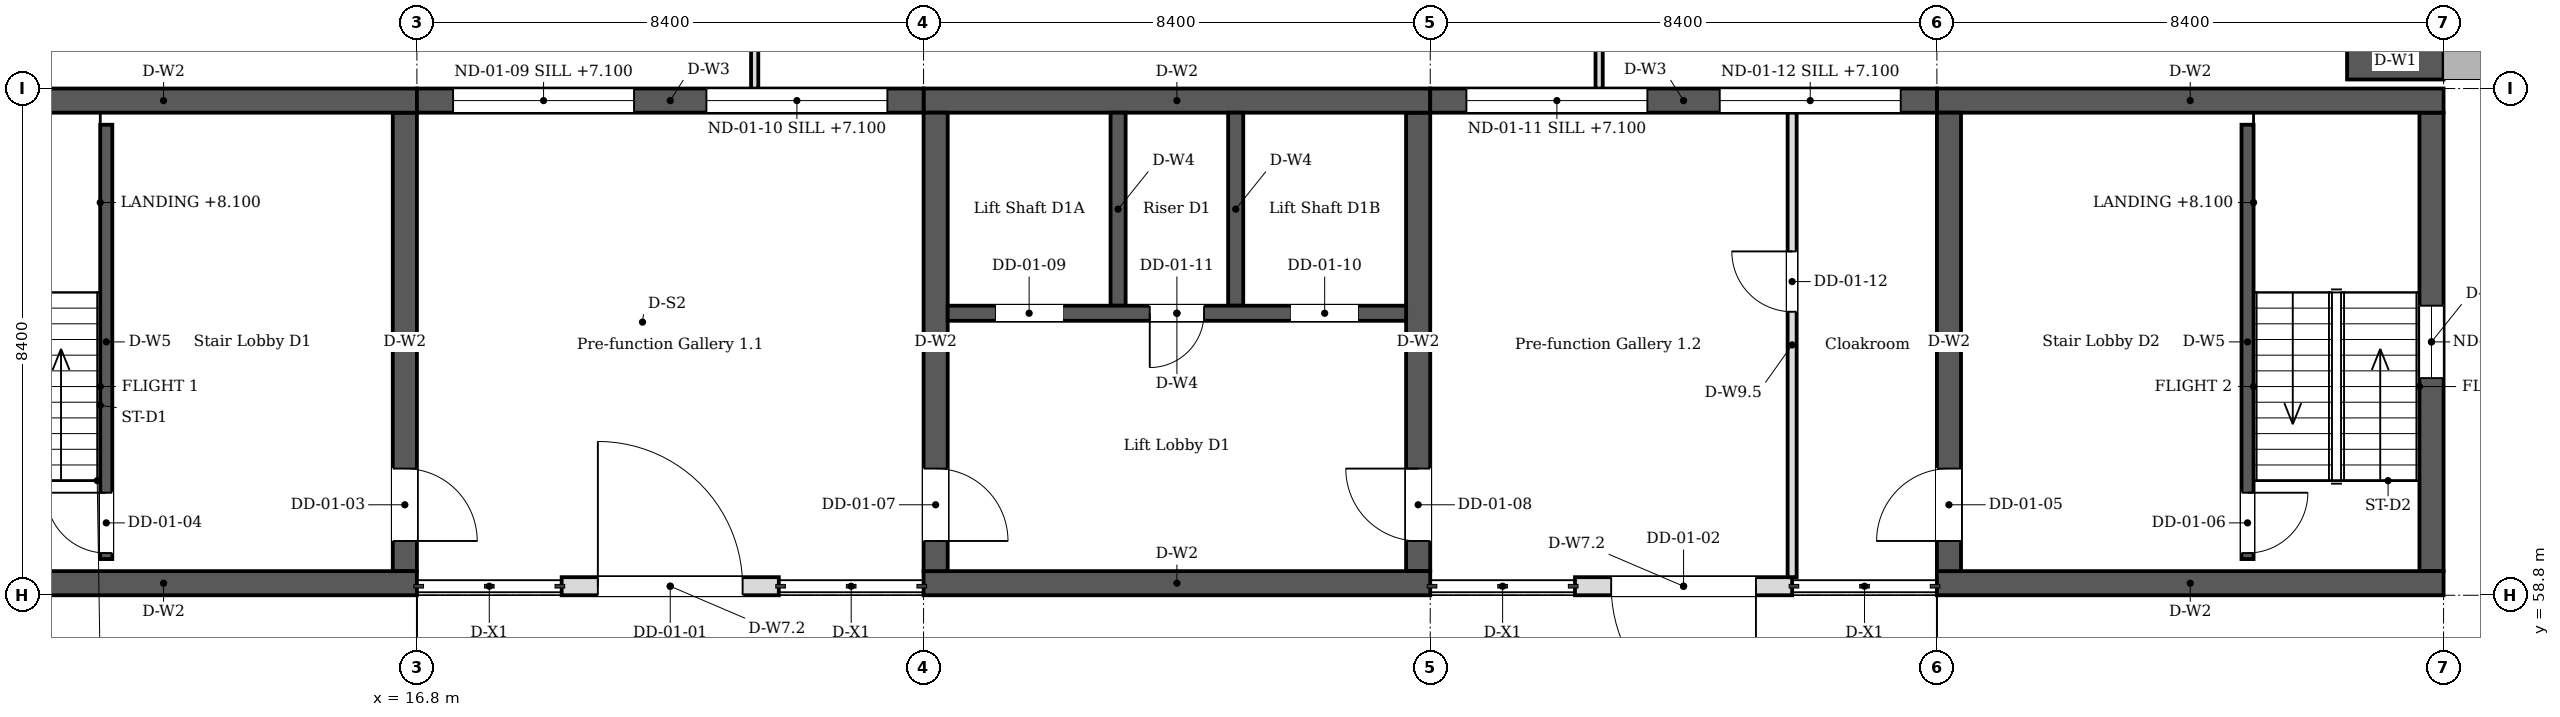
"""IFC4 building model, lengths in metres.
Left out: names, types, materials, properties, quantities, classifications, styles, units other than length and angle.
Written with IfcOpenShell. Run it as: python <this file> out.ifc"""

import sys

from ifc_helpers import new_model, si_unit, direction, frame, frame_2d, origin, place, context, subcontext, project, spatial, rectangle, extrude, element, fill, save


model = new_model("IFC4")
c1 = context("Model", 3, precision=1e-05, world=origin(), true_north=direction((0.0, 1.0)))
c2 = subcontext(c1, "Body", "Model", "MODEL_VIEW")
j1 = project(units=[si_unit("LENGTHUNIT", "METRE"), si_unit("PLANEANGLEUNIT", "RADIAN")], contexts=[c1])
p1 = place(None, origin())
s1 = spatial("IfcSite", under=j1, at=p1, CompositionType="ELEMENT")
p2 = place(p1, origin())
s2 = spatial("IfcBuilding", under=s1, at=p2, CompositionType="ELEMENT")
p3 = place(p2, origin())
s3 = spatial("IfcBuildingStorey", under=s2, at=p3, CompositionType="ELEMENT", Elevation=0.0)
p4 = place(p3, frame((50.4, 67.65, 0.0), z_axis=(0.0, 0.0, 1.0), x_axis=(-1.0, 0.0, 0.0)))
e1 = element("IfcWall", 1, at=p4, inside=s3, PredefinedType="SOLIDWALL", context=c2, shape_type="SweptSolid", body=[
    extrude(rectangle(XDim=1.6, YDim=0.6, at=frame_2d((0.8, 0.0))), origin(), (0.0, 0.0, 1.0), 14.467),
])
p5 = place(p2, frame((0.0, 0.0, 6.0)))
s4 = spatial("IfcBuildingStorey", under=s2, at=p5, CompositionType="ELEMENT", Elevation=6.0)
for number, where, z_axis, x_axis in (
    (2, (8.4, 59.0, 0.0), (0.0, 0.0, 1.0), (1.0, 0.0, 0.0)),
    (3, (8.4, 67.0, 0.0), (0.0, 0.0, 1.0), (1.0, 0.0, 0.0)),
):
    element("IfcWall", number, at=place(p5, frame(where, z_axis=z_axis, x_axis=x_axis)), inside=s4, PredefinedType="SOLIDWALL", context=c2, shape_type="SweptSolid", body=[
        extrude(rectangle(XDim=8.4, YDim=0.4, at=frame_2d((4.2, 0.0))), origin(), (0.0, 0.0, 1.0), 3.92),
    ])
p6 = place(p5, frame((16.6, 59.2, 0.0), z_axis=(0.0, 0.0, 1.0), x_axis=(0.0, 1.0, 0.0)))
e4 = element("IfcWall", 4, at=p6, inside=s4, PredefinedType="SOLIDWALL", context=c2, shape_type="SweptSolid", body=[
    extrude(rectangle(XDim=7.6, YDim=0.4, at=frame_2d((3.8, 0.0))), origin(), (0.0, 0.0, 1.0), 3.92),
])
p7 = place(p6, frame((0.5, 0.0, 0.0)))
e5 = element("IfcOpeningElement", 5, at=p7, cuts=e4, PredefinedType="OPENING", context=c2, shape_type="SweptSolid", body=[
    extrude(rectangle(XDim=1.2, YDim=2.1, at=frame_2d((0.6, 1.05))), frame((0.0, 0.21, 0.0), z_axis=(0.0, -1.0, 0.0), x_axis=(1.0, 0.0, 0.0)), (0.0, 0.0, 1.0), 0.42),
])
for number, where, z_axis, x_axis in (
    (6, (25.2, 59.0, 0.0), (0.0, 0.0, 1.0), (1.0, 0.0, 0.0)),
    (7, (25.2, 67.0, 0.0), (0.0, 0.0, 1.0), (1.0, 0.0, 0.0)),
):
    element("IfcWall", number, at=place(p5, frame(where, z_axis=z_axis, x_axis=x_axis)), inside=s4, PredefinedType="SOLIDWALL", context=c2, shape_type="SweptSolid", body=[
        extrude(rectangle(XDim=8.4, YDim=0.4, at=frame_2d((4.2, 0.0))), origin(), (0.0, 0.0, 1.0), 3.92),
    ])
p8 = place(p5, frame((25.4, 59.2, 0.0), z_axis=(0.0, 0.0, 1.0), x_axis=(0.0, 1.0, 0.0)))
e8 = element("IfcWall", 8, at=p8, inside=s4, PredefinedType="SOLIDWALL", context=c2, shape_type="SweptSolid", body=[
    extrude(rectangle(XDim=7.6, YDim=0.4, at=frame_2d((3.8, 0.0))), origin(), (0.0, 0.0, 1.0), 3.92),
])
p9 = place(p8, frame((0.5, 0.0, 0.0)))
e9 = element("IfcOpeningElement", 9, at=p9, cuts=e8, PredefinedType="OPENING", context=c2, shape_type="SweptSolid", body=[
    extrude(rectangle(XDim=1.2, YDim=2.1, at=frame_2d((0.6, 1.05))), frame((0.0, 0.21, 0.0), z_axis=(0.0, -1.0, 0.0), x_axis=(1.0, 0.0, 0.0)), (0.0, 0.0, 1.0), 0.42),
])
p10 = place(p5, frame((33.4, 59.2, 0.0), z_axis=(0.0, 0.0, 1.0), x_axis=(0.0, 1.0, 0.0)))
e10 = element("IfcWall", 10, at=p10, inside=s4, PredefinedType="SOLIDWALL", context=c2, shape_type="SweptSolid", body=[
    extrude(rectangle(XDim=7.6, YDim=0.4, at=frame_2d((3.8, 0.0))), origin(), (0.0, 0.0, 1.0), 3.92),
])
p11 = place(p10, frame((0.5, 0.0, 0.0)))
e11 = element("IfcOpeningElement", 11, at=p11, cuts=e10, PredefinedType="OPENING", context=c2, shape_type="SweptSolid", body=[
    extrude(rectangle(XDim=1.2, YDim=2.1, at=frame_2d((0.6, 1.05))), frame((0.0, 0.21, 0.0), z_axis=(0.0, -1.0, 0.0), x_axis=(1.0, 0.0, 0.0)), (0.0, 0.0, 1.0), 0.42),
])
for number, where, z_axis, x_axis in (
    (12, (42.0, 59.0, 0.0), (0.0, 0.0, 1.0), (1.0, 0.0, 0.0)),
    (13, (42.0, 67.0, 0.0), (0.0, 0.0, 1.0), (1.0, 0.0, 0.0)),
):
    element("IfcWall", number, at=place(p5, frame(where, z_axis=z_axis, x_axis=x_axis)), inside=s4, PredefinedType="SOLIDWALL", context=c2, shape_type="SweptSolid", body=[
        extrude(rectangle(XDim=8.4, YDim=0.4, at=frame_2d((4.2, 0.0))), origin(), (0.0, 0.0, 1.0), 3.92),
    ])
p12 = place(p5, frame((42.2, 59.2, 0.0), z_axis=(0.0, 0.0, 1.0), x_axis=(0.0, 1.0, 0.0)))
e14 = element("IfcWall", 14, at=p12, inside=s4, PredefinedType="SOLIDWALL", context=c2, shape_type="SweptSolid", body=[
    extrude(rectangle(XDim=7.6, YDim=0.4, at=frame_2d((3.8, 0.0))), origin(), (0.0, 0.0, 1.0), 3.92),
])
p13 = place(p12, frame((0.5, 0.0, 0.0)))
e15 = element("IfcOpeningElement", 15, at=p13, cuts=e14, PredefinedType="OPENING", context=c2, shape_type="SweptSolid", body=[
    extrude(rectangle(XDim=1.2, YDim=2.1, at=frame_2d((0.6, 1.05))), frame((0.0, 0.21, 0.0), z_axis=(0.0, -1.0, 0.0), x_axis=(1.0, 0.0, 0.0)), (0.0, 0.0, 1.0), 0.42),
])
p14 = place(p5, frame((50.2, 59.2, 0.0), z_axis=(0.0, 0.0, 1.0), x_axis=(0.0, 1.0, 0.0)))
e16 = element("IfcWall", 16, at=p14, inside=s4, PredefinedType="SOLIDWALL", context=c2, shape_type="SweptSolid", body=[
    extrude(rectangle(XDim=7.6, YDim=0.4, at=frame_2d((3.8, 0.0))), origin(), (0.0, 0.0, 1.0), 3.92),
])
p15 = place(p14, frame((3.2, 0.0, 0.9)))
e17 = element("IfcOpeningElement", 17, at=p15, cuts=e16, PredefinedType="OPENING", context=c2, shape_type="SweptSolid", body=[
    extrude(rectangle(XDim=1.2, YDim=1.5, at=frame_2d((0.6, 0.75))), frame((0.0, 0.21, 0.0), z_axis=(0.0, -1.0, 0.0), x_axis=(1.0, 0.0, 0.0)), (0.0, 0.0, 1.0), 0.42),
])
p16 = place(p5, frame((25.6, 63.475, 0.0), z_axis=(0.0, 0.0, 1.0), x_axis=(1.0, 0.0, 0.0)))
e18 = element("IfcWall", 18, at=p16, inside=s4, PredefinedType="SOLIDWALL", context=c2, shape_type="SweptSolid", body=[
    extrude(rectangle(XDim=7.6, YDim=0.25, at=frame_2d((3.8, 0.0))), origin(), (0.0, 0.0, 1.0), 3.92),
])
p17 = place(p16, frame((0.8, 0.0, 0.0)))
e19 = element("IfcOpeningElement", 19, at=p17, cuts=e18, PredefinedType="OPENING", context=c2, shape_type="SweptSolid", body=[
    extrude(rectangle(XDim=1.1, YDim=2.1, at=frame_2d((0.55, 1.05))), frame((0.0, 0.135, 0.0), z_axis=(0.0, -1.0, 0.0), x_axis=(1.0, 0.0, 0.0)), (0.0, 0.0, 1.0), 0.27),
])
p18 = place(p16, frame((5.7, 0.0, 0.0)))
e20 = element("IfcOpeningElement", 20, at=p18, cuts=e18, PredefinedType="OPENING", context=c2, shape_type="SweptSolid", body=[
    extrude(rectangle(XDim=1.1, YDim=2.1, at=frame_2d((0.55, 1.05))), frame((0.0, 0.135, 0.0), z_axis=(0.0, -1.0, 0.0), x_axis=(1.0, 0.0, 0.0)), (0.0, 0.0, 1.0), 0.27),
])
p19 = place(p16, frame((3.35, 0.0, 0.0)))
e21 = element("IfcOpeningElement", 21, at=p19, cuts=e18, PredefinedType="OPENING", context=c2, shape_type="SweptSolid", body=[
    extrude(rectangle(XDim=0.9, YDim=2.1, at=frame_2d((0.45, 1.05))), frame((0.0, 0.135, 0.0), z_axis=(0.0, -1.0, 0.0), x_axis=(1.0, 0.0, 0.0)), (0.0, 0.0, 1.0), 0.27),
])
for number, where, z_axis, x_axis in (
    (22, (28.425, 63.6, 0.0), (0.0, 0.0, 1.0), (0.0, 1.0, 0.0)),
    (23, (30.375, 63.6, 0.0), (0.0, 0.0, 1.0), (0.0, 1.0, 0.0)),
):
    element("IfcWall", number, at=place(p5, frame(where, z_axis=z_axis, x_axis=x_axis)), inside=s4, PredefinedType="SOLIDWALL", context=c2, shape_type="SweptSolid", body=[
        extrude(rectangle(XDim=3.2, YDim=0.25, at=frame_2d((1.6, 0.0))), origin(), (0.0, 0.0, 1.0), 3.92),
    ])
p20 = place(p5, frame((11.65, 59.4, 0.0), z_axis=(0.0, 0.0, 1.0), x_axis=(0.0, 1.0, 0.0)))
e24 = element("IfcWall", 24, at=p20, inside=s4, PredefinedType="SOLIDWALL", context=c2, shape_type="SweptSolid", body=[
    extrude(rectangle(XDim=7.2, YDim=0.2, at=frame_2d((3.6, 0.0))), origin(), (0.0, 0.0, 1.0), 3.92),
])
p21 = place(p20, frame((0.1, 0.0, 0.0)))
e25 = element("IfcOpeningElement", 25, at=p21, cuts=e24, PredefinedType="OPENING", context=c2, shape_type="SweptSolid", body=[
    extrude(rectangle(XDim=1.0, YDim=2.1, at=frame_2d((0.5, 1.05))), frame((0.0, 0.11, 0.0), z_axis=(0.0, -1.0, 0.0), x_axis=(1.0, 0.0, 0.0)), (0.0, 0.0, 1.0), 0.22),
])
p22 = place(p5, frame((47.15, 59.4, 0.0), z_axis=(0.0, 0.0, 1.0), x_axis=(0.0, 1.0, 0.0)))
e26 = element("IfcWall", 26, at=p22, inside=s4, PredefinedType="SOLIDWALL", context=c2, shape_type="SweptSolid", body=[
    extrude(rectangle(XDim=7.2, YDim=0.2, at=frame_2d((3.6, 0.0))), origin(), (0.0, 0.0, 1.0), 3.92),
])
p23 = place(p22, frame((0.1, 0.0, 0.0)))
e27 = element("IfcOpeningElement", 27, at=p23, cuts=e26, PredefinedType="OPENING", context=c2, shape_type="SweptSolid", body=[
    extrude(rectangle(XDim=1.0, YDim=2.1, at=frame_2d((0.5, 1.05))), frame((0.0, 0.11, 0.0), z_axis=(0.0, -1.0, 0.0), x_axis=(1.0, 0.0, 0.0)), (0.0, 0.0, 1.0), 0.22),
])
p24 = place(p5, frame((19.2, 58.95, 0.0), z_axis=(0.0, 0.0, 1.0), x_axis=(1.0, 0.0, 0.0)))
e28 = element("IfcWall", 28, at=p24, inside=s4, PredefinedType="SOLIDWALL", context=c2, shape_type="SweptSolid", body=[
    extrude(rectangle(XDim=3.6, YDim=0.3, at=frame_2d((1.8, 0.0))), origin(), (0.0, 0.0, 1.0), 3.42),
])
p25 = place(p24, frame((0.6, 0.0, 0.0)))
e29 = element("IfcOpeningElement", 29, at=p25, cuts=e28, PredefinedType="OPENING", context=c2, shape_type="SweptSolid", body=[
    extrude(rectangle(XDim=2.4, YDim=2.4, at=frame_2d((1.2, 1.2))), frame((0.0, 0.16, 0.0), z_axis=(0.0, -1.0, 0.0), x_axis=(1.0, 0.0, 0.0)), (0.0, 0.0, 1.0), 0.32),
])
p26 = place(p5, frame((36.0, 58.95, 0.0), z_axis=(0.0, 0.0, 1.0), x_axis=(1.0, 0.0, 0.0)))
e30 = element("IfcWall", 30, at=p26, inside=s4, PredefinedType="SOLIDWALL", context=c2, shape_type="SweptSolid", body=[
    extrude(rectangle(XDim=3.6, YDim=0.3, at=frame_2d((1.8, 0.0))), origin(), (0.0, 0.0, 1.0), 3.42),
])
p27 = place(p26, frame((0.6, 0.0, 0.0)))
e31 = element("IfcOpeningElement", 31, at=p27, cuts=e30, PredefinedType="OPENING", context=c2, shape_type="SweptSolid", body=[
    extrude(rectangle(XDim=2.4, YDim=2.4, at=frame_2d((1.2, 1.2))), frame((0.0, 0.16, 0.0), z_axis=(0.0, -1.0, 0.0), x_axis=(1.0, 0.0, 0.0)), (0.0, 0.0, 1.0), 0.32),
])
for number, where, z_axis, x_axis in (
    (32, (22.4, 67.2, 0.0), (0.0, 0.0, 1.0), (0.0, 1.0, 0.0)),
    (33, (36.4, 67.2, 0.0), (0.0, 0.0, 1.0), (0.0, 1.0, 0.0)),
):
    element("IfcWall", number, at=place(p3, frame(where, z_axis=z_axis, x_axis=x_axis)), inside=s3, PredefinedType="MOVABLE", context=c2, shape_type="SweptSolid", body=[
        extrude(rectangle(XDim=33.6, YDim=0.12, at=frame_2d((16.8, 0.0))), origin(), (0.0, 0.0, 1.0), 14.467),
    ])
p28 = place(p5, frame((16.8, 67.0, 0.0), z_axis=(0.0, 0.0, 1.0), x_axis=(1.0, 0.0, 0.0)))
e34 = element("IfcWall", 34, at=p28, inside=s4, PredefinedType="SOLIDWALL", context=c2, shape_type="SweptSolid", body=[
    extrude(rectangle(XDim=8.4, YDim=0.4, at=frame_2d((4.2, 0.0))), origin(), (0.0, 0.0, 1.0), 3.42),
])
p29 = place(p28, frame((0.6, 0.0, 1.1)))
e35 = element("IfcOpeningElement", 35, at=p29, cuts=e34, PredefinedType="OPENING", context=c2, shape_type="SweptSolid", body=[
    extrude(rectangle(XDim=3.0, YDim=2.0, at=frame_2d((1.5, 1.0))), frame((0.0, 0.21, 0.0), z_axis=(0.0, -1.0, 0.0), x_axis=(1.0, 0.0, 0.0)), (0.0, 0.0, 1.0), 0.42),
])
p30 = place(p28, frame((4.8, 0.0, 1.1)))
e36 = element("IfcOpeningElement", 36, at=p30, cuts=e34, PredefinedType="OPENING", context=c2, shape_type="SweptSolid", body=[
    extrude(rectangle(XDim=3.0, YDim=2.0, at=frame_2d((1.5, 1.0))), frame((0.0, 0.21, 0.0), z_axis=(0.0, -1.0, 0.0), x_axis=(1.0, 0.0, 0.0)), (0.0, 0.0, 1.0), 0.42),
])
p31 = place(p5, frame((33.6, 67.0, 0.0), z_axis=(0.0, 0.0, 1.0), x_axis=(1.0, 0.0, 0.0)))
e37 = element("IfcWall", 37, at=p31, inside=s4, PredefinedType="SOLIDWALL", context=c2, shape_type="SweptSolid", body=[
    extrude(rectangle(XDim=8.4, YDim=0.4, at=frame_2d((4.2, 0.0))), origin(), (0.0, 0.0, 1.0), 3.42),
])
p32 = place(p31, frame((0.6, 0.0, 1.1)))
e38 = element("IfcOpeningElement", 38, at=p32, cuts=e37, PredefinedType="OPENING", context=c2, shape_type="SweptSolid", body=[
    extrude(rectangle(XDim=3.0, YDim=2.0, at=frame_2d((1.5, 1.0))), frame((0.0, 0.21, 0.0), z_axis=(0.0, -1.0, 0.0), x_axis=(1.0, 0.0, 0.0)), (0.0, 0.0, 1.0), 0.42),
])
p33 = place(p31, frame((4.8, 0.0, 1.1)))
e39 = element("IfcOpeningElement", 39, at=p33, cuts=e37, PredefinedType="OPENING", context=c2, shape_type="SweptSolid", body=[
    extrude(rectangle(XDim=3.0, YDim=2.0, at=frame_2d((1.5, 1.0))), frame((0.0, 0.21, 0.0), z_axis=(0.0, -1.0, 0.0), x_axis=(1.0, 0.0, 0.0)), (0.0, 0.0, 1.0), 0.42),
])
p34 = place(p5, frame((39.6, 59.1, 0.0), z_axis=(0.0, 0.0, 1.0), x_axis=(0.0, 1.0, 0.0)))
e40 = element("IfcWall", 40, at=p34, inside=s4, PredefinedType="PARTITIONING", context=c2, shape_type="SweptSolid", body=[
    extrude(rectangle(XDim=7.7, YDim=0.15, at=frame_2d((3.85, 0.0))), origin(), (0.0, 0.0, 1.0), 3.92),
])
p35 = place(p34, frame((4.4, 0.0, 0.0)))
e41 = element("IfcOpeningElement", 41, at=p35, cuts=e40, PredefinedType="OPENING", context=c2, shape_type="SweptSolid", body=[
    extrude(rectangle(XDim=1.0, YDim=2.1, at=frame_2d((0.5, 1.05))), frame((0.0, 0.085, 0.0), z_axis=(0.0, -1.0, 0.0), x_axis=(1.0, 0.0, 0.0)), (0.0, 0.0, 1.0), 0.17),
])
p36 = place(p25, origin())
e42 = element("IfcDoor", 42, at=p36, inside=s4, OperationType="DOUBLE_DOOR_SINGLE_SWING", PredefinedType="DOOR", context=c2, shape_type="SweptSolid", body=[
    extrude(rectangle(XDim=2.4, YDim=2.4, at=frame_2d((1.2, 1.2))), frame((0.0, 0.025, 0.0), z_axis=(0.0, -1.0, 0.0), x_axis=(1.0, 0.0, 0.0)), (0.0, 0.0, 1.0), 0.05),
])
fill(e29, e42)
p37 = place(p27, origin())
e43 = element("IfcDoor", 43, at=p37, inside=s4, OperationType="DOUBLE_DOOR_SINGLE_SWING", PredefinedType="DOOR", context=c2, shape_type="SweptSolid", body=[
    extrude(rectangle(XDim=2.4, YDim=2.4, at=frame_2d((1.2, 1.2))), frame((0.0, 0.025, 0.0), z_axis=(0.0, -1.0, 0.0), x_axis=(1.0, 0.0, 0.0)), (0.0, 0.0, 1.0), 0.05),
])
fill(e31, e43)
p38 = place(p15, origin())
e44 = element("IfcWindow", 44, at=p38, inside=s4, PartitioningType="SINGLE_PANEL", PredefinedType="WINDOW", context=c2, shape_type="SweptSolid", body=[
    extrude(rectangle(XDim=1.2, YDim=1.5, at=frame_2d((0.6, 0.75))), frame((0.0, 0.03, 0.0), z_axis=(0.0, -1.0, 0.0), x_axis=(1.0, 0.0, 0.0)), (0.0, 0.0, 1.0), 0.06),
])
fill(e17, e44)
p39 = place(p7, origin())
e45 = element("IfcDoor", 45, at=p39, inside=s4, OperationType="SINGLE_SWING_LEFT", PredefinedType="DOOR", context=c2, shape_type="SweptSolid", body=[
    extrude(rectangle(XDim=1.2, YDim=2.1, at=frame_2d((0.6, 1.05))), frame((0.0, 0.025, 0.0), z_axis=(0.0, -1.0, 0.0), x_axis=(1.0, 0.0, 0.0)), (0.0, 0.0, 1.0), 0.05),
])
fill(e5, e45)
p40 = place(p21, origin())
e46 = element("IfcDoor", 46, at=p40, inside=s4, OperationType="SINGLE_SWING_LEFT", PredefinedType="DOOR", context=c2, shape_type="SweptSolid", body=[
    extrude(rectangle(XDim=1.0, YDim=2.1, at=frame_2d((0.5, 1.05))), frame((0.0, 0.025, 0.0), z_axis=(0.0, -1.0, 0.0), x_axis=(1.0, 0.0, 0.0)), (0.0, 0.0, 1.0), 0.05),
])
fill(e25, e46)
p41 = place(p13, origin())
e47 = element("IfcDoor", 47, at=p41, inside=s4, OperationType="SINGLE_SWING_LEFT", PredefinedType="DOOR", context=c2, shape_type="SweptSolid", body=[
    extrude(rectangle(XDim=1.2, YDim=2.1, at=frame_2d((0.6, 1.05))), frame((0.0, 0.025, 0.0), z_axis=(0.0, -1.0, 0.0), x_axis=(1.0, 0.0, 0.0)), (0.0, 0.0, 1.0), 0.05),
])
fill(e15, e47)
p42 = place(p23, origin())
e48 = element("IfcDoor", 48, at=p42, inside=s4, OperationType="SINGLE_SWING_LEFT", PredefinedType="DOOR", context=c2, shape_type="SweptSolid", body=[
    extrude(rectangle(XDim=1.0, YDim=2.1, at=frame_2d((0.5, 1.05))), frame((0.0, 0.025, 0.0), z_axis=(0.0, -1.0, 0.0), x_axis=(1.0, 0.0, 0.0)), (0.0, 0.0, 1.0), 0.05),
])
fill(e27, e48)
p43 = place(p9, origin())
e49 = element("IfcDoor", 49, at=p43, inside=s4, OperationType="SINGLE_SWING_LEFT", PredefinedType="DOOR", context=c2, shape_type="SweptSolid", body=[
    extrude(rectangle(XDim=1.2, YDim=2.1, at=frame_2d((0.6, 1.05))), frame((0.0, 0.025, 0.0), z_axis=(0.0, -1.0, 0.0), x_axis=(1.0, 0.0, 0.0)), (0.0, 0.0, 1.0), 0.05),
])
fill(e9, e49)
p44 = place(p11, origin())
e50 = element("IfcDoor", 50, at=p44, inside=s4, OperationType="SINGLE_SWING_LEFT", PredefinedType="DOOR", context=c2, shape_type="SweptSolid", body=[
    extrude(rectangle(XDim=1.2, YDim=2.1, at=frame_2d((0.6, 1.05))), frame((0.0, 0.025, 0.0), z_axis=(0.0, -1.0, 0.0), x_axis=(1.0, 0.0, 0.0)), (0.0, 0.0, 1.0), 0.05),
])
fill(e11, e50)
p45 = place(p17, origin())
e51 = element("IfcDoor", 51, at=p45, inside=s4, OperationType="DOUBLE_DOOR_SLIDING", PredefinedType="DOOR", context=c2, shape_type="SweptSolid", body=[
    extrude(rectangle(XDim=1.1, YDim=2.1, at=frame_2d((0.55, 1.05))), frame((0.0, 0.025, 0.0), z_axis=(0.0, -1.0, 0.0), x_axis=(1.0, 0.0, 0.0)), (0.0, 0.0, 1.0), 0.05),
])
fill(e19, e51)
p46 = place(p18, origin())
e52 = element("IfcDoor", 52, at=p46, inside=s4, OperationType="DOUBLE_DOOR_SLIDING", PredefinedType="DOOR", context=c2, shape_type="SweptSolid", body=[
    extrude(rectangle(XDim=1.1, YDim=2.1, at=frame_2d((0.55, 1.05))), frame((0.0, 0.025, 0.0), z_axis=(0.0, -1.0, 0.0), x_axis=(1.0, 0.0, 0.0)), (0.0, 0.0, 1.0), 0.05),
])
fill(e20, e52)
p47 = place(p19, origin())
e53 = element("IfcDoor", 53, at=p47, inside=s4, OperationType="SINGLE_SWING_LEFT", PredefinedType="DOOR", context=c2, shape_type="SweptSolid", body=[
    extrude(rectangle(XDim=0.9, YDim=2.1, at=frame_2d((0.45, 1.05))), frame((0.0, 0.025, 0.0), z_axis=(0.0, -1.0, 0.0), x_axis=(1.0, 0.0, 0.0)), (0.0, 0.0, 1.0), 0.05),
])
fill(e21, e53)
p48 = place(p29, origin())
e54 = element("IfcWindow", 54, at=p48, inside=s4, PartitioningType="SINGLE_PANEL", PredefinedType="WINDOW", context=c2, shape_type="SweptSolid", body=[
    extrude(rectangle(XDim=3.0, YDim=2.0, at=frame_2d((1.5, 1.0))), frame((0.0, 0.03, 0.0), z_axis=(0.0, -1.0, 0.0), x_axis=(1.0, 0.0, 0.0)), (0.0, 0.0, 1.0), 0.06),
])
fill(e35, e54)
p49 = place(p30, origin())
e55 = element("IfcWindow", 55, at=p49, inside=s4, PartitioningType="SINGLE_PANEL", PredefinedType="WINDOW", context=c2, shape_type="SweptSolid", body=[
    extrude(rectangle(XDim=3.0, YDim=2.0, at=frame_2d((1.5, 1.0))), frame((0.0, 0.03, 0.0), z_axis=(0.0, -1.0, 0.0), x_axis=(1.0, 0.0, 0.0)), (0.0, 0.0, 1.0), 0.06),
])
fill(e36, e55)
p50 = place(p32, origin())
e56 = element("IfcWindow", 56, at=p50, inside=s4, PartitioningType="SINGLE_PANEL", PredefinedType="WINDOW", context=c2, shape_type="SweptSolid", body=[
    extrude(rectangle(XDim=3.0, YDim=2.0, at=frame_2d((1.5, 1.0))), frame((0.0, 0.03, 0.0), z_axis=(0.0, -1.0, 0.0), x_axis=(1.0, 0.0, 0.0)), (0.0, 0.0, 1.0), 0.06),
])
fill(e38, e56)
p51 = place(p33, origin())
e57 = element("IfcWindow", 57, at=p51, inside=s4, PartitioningType="SINGLE_PANEL", PredefinedType="WINDOW", context=c2, shape_type="SweptSolid", body=[
    extrude(rectangle(XDim=3.0, YDim=2.0, at=frame_2d((1.5, 1.0))), frame((0.0, 0.03, 0.0), z_axis=(0.0, -1.0, 0.0), x_axis=(1.0, 0.0, 0.0)), (0.0, 0.0, 1.0), 0.06),
])
fill(e39, e57)
p52 = place(p35, origin())
e58 = element("IfcDoor", 58, at=p52, inside=s4, OperationType="SINGLE_SWING_LEFT", PredefinedType="DOOR", context=c2, shape_type="SweptSolid", body=[
    extrude(rectangle(XDim=1.0, YDim=2.1, at=frame_2d((0.5, 1.05))), frame((0.0, 0.025, 0.0), z_axis=(0.0, -1.0, 0.0), x_axis=(1.0, 0.0, 0.0)), (0.0, 0.0, 1.0), 0.05),
])
fill(e41, e58)
save(model, sys.argv[1])
